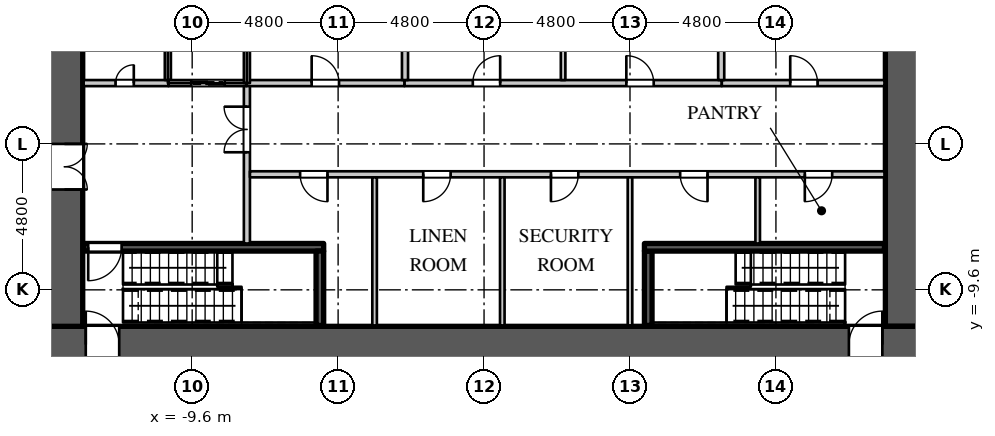
"""IFC4 building model, lengths in metres.
Left out: names, types, materials, properties, quantities, classifications, styles, units other than length and angle.
Written with IfcOpenShell. Run it as: python <this file> out.ifc"""

import sys

from ifc_helpers import new_model, si_unit, direction, frame, frame_2d, origin, place, context, subcontext, project, spatial, rectangle, extrude, element, fill, save


model = new_model("IFC4")
c1 = context("Model", 3, precision=1e-05, world=origin(), true_north=direction((0.0, 1.0)))
c2 = subcontext(c1, "Body", "Model", "MODEL_VIEW")
j1 = project(units=[si_unit("LENGTHUNIT", "METRE"), si_unit("PLANEANGLEUNIT", "RADIAN")], contexts=[c1])
p1 = place(None, origin())
s1 = spatial("IfcSite", under=j1, at=p1, CompositionType="ELEMENT")
p2 = place(p1, origin())
s2 = spatial("IfcBuilding", under=s1, at=p2, CompositionType="ELEMENT")
p3 = place(p2, frame((0.0, 0.0, -4.5)))
s3 = spatial("IfcBuildingStorey", under=s2, at=p3, CompositionType="ELEMENT", Elevation=-4.5)
p4 = place(p3, frame((-14.4, -11.4, 0.0), z_axis=(0.0, 0.0, 1.0), x_axis=(1.0, 0.0, 0.0)))
e1 = element("IfcWall", 1, at=p4, inside=s3, PredefinedType="SHEAR", context=c2, shape_type="SweptSolid", body=[
    extrude(rectangle(XDim=28.8, YDim=1.2, at=frame_2d((14.4, 0.0))), origin(), (0.0, 0.0, 1.0), 4.5),
])
p5 = place(p4, frame((1.3, 0.0, 0.0)))
e2 = element("IfcOpeningElement", 2, at=p5, cuts=e1, PredefinedType="OPENING", context=c2, shape_type="SweptSolid", body=[
    extrude(rectangle(XDim=1.1, YDim=2.2, at=frame_2d((0.55, 1.1))), frame((0.0, 0.61, 0.0), z_axis=(0.0, -1.0, 0.0), x_axis=(1.0, 0.0, 0.0)), (0.0, 0.0, 1.0), 1.22),
])
p6 = place(p4, frame((26.4, 0.0, 0.0)))
e3 = element("IfcOpeningElement", 3, at=p6, cuts=e1, PredefinedType="OPENING", context=c2, shape_type="SweptSolid", body=[
    extrude(rectangle(XDim=1.1, YDim=2.2, at=frame_2d((0.55, 1.1))), frame((0.0, 0.61, 0.0), z_axis=(0.0, -1.0, 0.0), x_axis=(1.0, 0.0, 0.0)), (0.0, 0.0, 1.0), 1.22),
])
p7 = place(p3, frame((13.8, -10.8, 0.0), z_axis=(0.0, 0.0, 1.0), x_axis=(0.0, 1.0, 0.0)))
e4 = element("IfcWall", 4, at=p7, inside=s3, PredefinedType="SHEAR", context=c2, shape_type="SweptSolid", body=[
    extrude(rectangle(XDim=21.6, YDim=1.2, at=frame_2d((10.8, 0.0))), origin(), (0.0, 0.0, 1.0), 4.5),
])
p8 = place(p7, frame((14.35, 0.0, 0.0)))
e5 = element("IfcOpeningElement", 5, at=p8, cuts=e4, PredefinedType="OPENING", context=c2, shape_type="SweptSolid", body=[
    extrude(rectangle(XDim=1.5, YDim=2.4, at=frame_2d((0.75, 1.2))), frame((0.0, 0.61, 0.0), z_axis=(0.0, -1.0, 0.0), x_axis=(1.0, 0.0, 0.0)), (0.0, 0.0, 1.0), 1.22),
])
p9 = place(p3, frame((-13.8, -10.8, 0.0), z_axis=(0.0, 0.0, 1.0), x_axis=(0.0, 1.0, 0.0)))
e6 = element("IfcWall", 6, at=p9, inside=s3, PredefinedType="SHEAR", context=c2, shape_type="SweptSolid", body=[
    extrude(rectangle(XDim=21.6, YDim=1.2, at=frame_2d((10.8, 0.0))), origin(), (0.0, 0.0, 1.0), 4.5),
])
p10 = place(p9, frame((15.5, 0.0, 0.0)))
e7 = element("IfcOpeningElement", 7, at=p10, cuts=e6, PredefinedType="OPENING", context=c2, shape_type="SweptSolid", body=[
    extrude(rectangle(XDim=1.5, YDim=2.4, at=frame_2d((0.75, 1.2))), frame((0.0, 0.61, 0.0), z_axis=(0.0, -1.0, 0.0), x_axis=(1.0, 0.0, 0.0)), (0.0, 0.0, 1.0), 1.22),
])
p11 = place(p9, frame((4.5, 0.0, 0.0)))
e8 = element("IfcOpeningElement", 8, at=p11, cuts=e6, PredefinedType="OPENING", context=c2, shape_type="SweptSolid", body=[
    extrude(rectangle(XDim=1.5, YDim=2.4, at=frame_2d((0.75, 1.2))), frame((0.0, 0.61, 0.0), z_axis=(0.0, -1.0, 0.0), x_axis=(1.0, 0.0, 0.0)), (0.0, 0.0, 1.0), 1.22),
])
p12 = place(p3, frame((-7.8, -8.075, 0.0), z_axis=(0.0, 0.0, 1.0), x_axis=(0.0, 1.0, 0.0)))
e9 = element("IfcWall", 9, at=p12, inside=s3, PredefinedType="PARTITIONING", context=c2, shape_type="SweptSolid", body=[
    extrude(rectangle(XDim=5.275, YDim=0.2, at=frame_2d((2.637, 0.0))), origin(), (0.0, 0.0, 1.0), 4.048),
])
p13 = place(p12, frame((3.0, 0.0, 0.0)))
e10 = element("IfcOpeningElement", 10, at=p13, cuts=e9, PredefinedType="OPENING", context=c2, shape_type="SweptSolid", body=[
    extrude(rectangle(XDim=1.5, YDim=2.4, at=frame_2d((0.75, 1.2))), frame((0.0, 0.11, 0.0), z_axis=(0.0, -1.0, 0.0), x_axis=(1.0, 0.0, 0.0)), (0.0, 0.0, 1.0), 0.22),
])
p14 = place(p3, frame((-7.7, -5.8, 0.0), z_axis=(0.0, 0.0, 1.0), x_axis=(1.0, 0.0, 0.0)))
e11 = element("IfcWall", 11, at=p14, inside=s3, PredefinedType="PARTITIONING", context=c2, shape_type="SweptSolid", body=[
    extrude(rectangle(XDim=20.87, YDim=0.2, at=frame_2d((10.435, 0.0))), origin(), (0.0, 0.0, 1.0), 4.048),
])
p15 = place(p14, frame((1.65, 0.0, 0.0)))
e12 = element("IfcOpeningElement", 12, at=p15, cuts=e11, PredefinedType="OPENING", context=c2, shape_type="SweptSolid", body=[
    extrude(rectangle(XDim=0.9, YDim=2.2, at=frame_2d((0.45, 1.1))), frame((0.0, 0.11, 0.0), z_axis=(0.0, -1.0, 0.0), x_axis=(1.0, 0.0, 0.0)), (0.0, 0.0, 1.0), 0.22),
])
p16 = place(p14, frame((5.7, 0.0, 0.0)))
e13 = element("IfcOpeningElement", 13, at=p16, cuts=e11, PredefinedType="OPENING", context=c2, shape_type="SweptSolid", body=[
    extrude(rectangle(XDim=0.9, YDim=2.2, at=frame_2d((0.45, 1.1))), frame((0.0, 0.11, 0.0), z_axis=(0.0, -1.0, 0.0), x_axis=(1.0, 0.0, 0.0)), (0.0, 0.0, 1.0), 0.22),
])
p17 = place(p14, frame((9.9, 0.0, 0.0)))
e14 = element("IfcOpeningElement", 14, at=p17, cuts=e11, PredefinedType="OPENING", context=c2, shape_type="SweptSolid", body=[
    extrude(rectangle(XDim=0.9, YDim=2.2, at=frame_2d((0.45, 1.1))), frame((0.0, 0.11, 0.0), z_axis=(0.0, -1.0, 0.0), x_axis=(1.0, 0.0, 0.0)), (0.0, 0.0, 1.0), 0.22),
])
p18 = place(p14, frame((14.15, 0.0, 0.0)))
e15 = element("IfcOpeningElement", 15, at=p18, cuts=e11, PredefinedType="OPENING", context=c2, shape_type="SweptSolid", body=[
    extrude(rectangle(XDim=0.9, YDim=2.2, at=frame_2d((0.45, 1.1))), frame((0.0, 0.11, 0.0), z_axis=(0.0, -1.0, 0.0), x_axis=(1.0, 0.0, 0.0)), (0.0, 0.0, 1.0), 0.22),
])
p19 = place(p14, frame((18.25, 0.0, 0.0)))
e16 = element("IfcOpeningElement", 16, at=p19, cuts=e11, PredefinedType="OPENING", context=c2, shape_type="SweptSolid", body=[
    extrude(rectangle(XDim=0.9, YDim=2.2, at=frame_2d((0.45, 1.1))), frame((0.0, 0.11, 0.0), z_axis=(0.0, -1.0, 0.0), x_axis=(1.0, 0.0, 0.0)), (0.0, 0.0, 1.0), 0.22),
])
p20 = place(p3, frame((-2.62, -2.8, 0.0), z_axis=(0.0, 0.0, 1.0), x_axis=(1.0, 0.0, 0.0)))
e17 = element("IfcWall", 17, at=p20, inside=s3, PredefinedType="PARTITIONING", context=c2, shape_type="SweptSolid", body=[
    extrude(rectangle(XDim=10.44, YDim=0.2, at=frame_2d((5.22, 0.0))), origin(), (0.0, 0.0, 1.0), 4.048),
])
p21 = place(p20, frame((2.25, 0.0, 0.0)))
e18 = element("IfcOpeningElement", 18, at=p21, cuts=e17, PredefinedType="OPENING", context=c2, shape_type="SweptSolid", body=[
    extrude(rectangle(XDim=0.9, YDim=2.2, at=frame_2d((0.45, 1.1))), frame((0.0, 0.11, 0.0), z_axis=(0.0, -1.0, 0.0), x_axis=(1.0, 0.0, 0.0)), (0.0, 0.0, 1.0), 0.22),
])
p22 = place(p20, frame((7.3, 0.0, 0.0)))
e19 = element("IfcOpeningElement", 19, at=p22, cuts=e17, PredefinedType="OPENING", context=c2, shape_type="SweptSolid", body=[
    extrude(rectangle(XDim=0.9, YDim=2.2, at=frame_2d((0.45, 1.1))), frame((0.0, 0.11, 0.0), z_axis=(0.0, -1.0, 0.0), x_axis=(1.0, 0.0, 0.0)), (0.0, 0.0, 1.0), 0.22),
])
for number, where, z_axis, x_axis in (
    (20, (-3.6, -10.77, 0.0), (0.0, 0.0, 1.0), (0.0, 1.0, 0.0)),
    (21, (0.6, -10.77, 0.0), (0.0, 0.0, 1.0), (0.0, 1.0, 0.0)),
):
    element("IfcWall", number, at=place(p3, frame(where, z_axis=z_axis, x_axis=x_axis)), inside=s3, PredefinedType="PARTITIONING", context=c2, shape_type="SweptSolid", body=[
        extrude(rectangle(XDim=4.87, YDim=0.15, at=frame_2d((2.435, 0.0))), origin(), (0.0, 0.0, 1.0), 4.048),
    ])
p23 = place(p3, frame((2.6, -2.7, 0.0), z_axis=(0.0, 0.0, 1.0), x_axis=(0.0, 1.0, 0.0)))
e22 = element("IfcWall", 22, at=p23, inside=s3, PredefinedType="PARTITIONING", context=c2, shape_type="SweptSolid", body=[
    extrude(rectangle(XDim=2.7, YDim=0.15, at=frame_2d((1.35, 0.0))), origin(), (0.0, 0.0, 1.0), 4.048),
])
p24 = place(p3, frame((4.8, -10.77, 0.0), z_axis=(0.0, 0.0, 1.0), x_axis=(0.0, 1.0, 0.0)))
e23 = element("IfcWall", 23, at=p24, inside=s3, PredefinedType="PARTITIONING", context=c2, shape_type="SweptSolid", body=[
    extrude(rectangle(XDim=4.87, YDim=0.15, at=frame_2d((2.435, 0.0))), origin(), (0.0, 0.0, 1.0), 4.048),
])
p25 = place(p3, frame((9.0, -8.075, 0.0), z_axis=(0.0, 0.0, 1.0), x_axis=(0.0, 1.0, 0.0)))
e24 = element("IfcWall", 24, at=p25, inside=s3, PredefinedType="PARTITIONING", context=c2, shape_type="SweptSolid", body=[
    extrude(rectangle(XDim=2.175, YDim=0.15, at=frame_2d((1.087, 0.0))), origin(), (0.0, 0.0, 1.0), 4.048),
])
p26 = place(p3, frame((-13.17, -2.8, 0.0), z_axis=(0.0, 0.0, 1.0), x_axis=(1.0, 0.0, 0.0)))
e25 = element("IfcWall", 25, at=p26, inside=s3, PredefinedType="PARTITIONING", context=c2, shape_type="SweptSolid", body=[
    extrude(rectangle(XDim=2.79, YDim=0.2, at=frame_2d((1.395, 0.0))), origin(), (0.0, 0.0, 1.0), 4.048),
])
p27 = place(p26, frame((1.05, 0.0, 0.0)))
e26 = element("IfcOpeningElement", 26, at=p27, cuts=e25, PredefinedType="OPENING", context=c2, shape_type="SweptSolid", body=[
    extrude(rectangle(XDim=0.6, YDim=2.0, at=frame_2d((0.3, 1.0))), frame((0.0, 0.11, 0.0), z_axis=(0.0, -1.0, 0.0), x_axis=(1.0, 0.0, 0.0)), (0.0, 0.0, 1.0), 0.22),
])
p28 = place(p3, frame((-7.82, -2.8, 0.0), z_axis=(0.0, 0.0, 1.0), x_axis=(1.0, 0.0, 0.0)))
e27 = element("IfcWall", 27, at=p28, inside=s3, PredefinedType="PARTITIONING", context=c2, shape_type="SweptSolid", body=[
    extrude(rectangle(XDim=5.2, YDim=0.2, at=frame_2d((2.6, 0.0))), origin(), (0.0, 0.0, 1.0), 4.048),
])
p29 = place(p28, frame((2.15, 0.0, 0.0)))
e28 = element("IfcOpeningElement", 28, at=p29, cuts=e27, PredefinedType="OPENING", context=c2, shape_type="SweptSolid", body=[
    extrude(rectangle(XDim=0.9, YDim=2.2, at=frame_2d((0.45, 1.1))), frame((0.0, 0.11, 0.0), z_axis=(0.0, -1.0, 0.0), x_axis=(1.0, 0.0, 0.0)), (0.0, 0.0, 1.0), 0.22),
])
p30 = place(p3, frame((-2.6, -2.7, 0.0), z_axis=(0.0, 0.0, 1.0), x_axis=(0.0, 1.0, 0.0)))
e29 = element("IfcWall", 29, at=p30, inside=s3, PredefinedType="PARTITIONING", context=c2, shape_type="SweptSolid", body=[
    extrude(rectangle(XDim=2.7, YDim=0.2, at=frame_2d((1.35, 0.0))), origin(), (0.0, 0.0, 1.0), 4.048),
])
p31 = place(p3, frame((7.82, -2.8, 0.0), z_axis=(0.0, 0.0, 1.0), x_axis=(1.0, 0.0, 0.0)))
e30 = element("IfcWall", 30, at=p31, inside=s3, PredefinedType="PARTITIONING", context=c2, shape_type="SweptSolid", body=[
    extrude(rectangle(XDim=5.35, YDim=0.2, at=frame_2d((2.675, 0.0))), origin(), (0.0, 0.0, 1.0), 4.048),
])
p32 = place(p31, frame((2.25, 0.0, 0.0)))
e31 = element("IfcOpeningElement", 31, at=p32, cuts=e30, PredefinedType="OPENING", context=c2, shape_type="SweptSolid", body=[
    extrude(rectangle(XDim=0.9, YDim=2.2, at=frame_2d((0.45, 1.1))), frame((0.0, 0.11, 0.0), z_axis=(0.0, -1.0, 0.0), x_axis=(1.0, 0.0, 0.0)), (0.0, 0.0, 1.0), 0.22),
])
for number, where, z_axis, x_axis in (
    (32, (7.8, -2.7, 0.0), (0.0, 0.0, 1.0), (0.0, 1.0, 0.0)),
    (33, (-10.4, -2.7, 0.0), (0.0, 0.0, 1.0), (0.0, 1.0, 0.0)),
):
    element("IfcWall", number, at=place(p3, frame(where, z_axis=z_axis, x_axis=x_axis)), inside=s3, PredefinedType="PARTITIONING", context=c2, shape_type="SweptSolid", body=[
        extrude(rectangle(XDim=2.7, YDim=0.2, at=frame_2d((1.35, 0.0))), origin(), (0.0, 0.0, 1.0), 4.048),
    ])
p33 = place(p3, frame((-10.38, -2.8, 0.0), z_axis=(0.0, 0.0, 1.0), x_axis=(1.0, 0.0, 0.0)))
e34 = element("IfcWall", 34, at=p33, inside=s3, PredefinedType="PARTITIONING", context=c2, shape_type="SweptSolid", body=[
    extrude(rectangle(XDim=2.56, YDim=0.2, at=frame_2d((1.28, 0.0))), origin(), (0.0, 0.0, 1.0), 4.048),
])
p34 = place(p33, frame((0.75, 0.0, 0.0)))
e35 = element("IfcOpeningElement", 35, at=p34, cuts=e34, PredefinedType="OPENING", context=c2, shape_type="SweptSolid", body=[
    extrude(rectangle(XDim=1.1, YDim=2.2, at=frame_2d((0.55, 1.1))), frame((0.0, 0.11, 0.0), z_axis=(0.0, -1.0, 0.0), x_axis=(1.0, 0.0, 0.0)), (0.0, 0.0, 1.0), 0.22),
])
p35 = place(p3, frame((-7.8, -2.8, 0.0), z_axis=(0.0, 0.0, 1.0), x_axis=(0.0, 1.0, 0.0)))
e36 = element("IfcWall", 36, at=p35, inside=s3, PredefinedType="PARTITIONING", context=c2, shape_type="SweptSolid", body=[
    extrude(rectangle(XDim=2.8, YDim=0.2, at=frame_2d((1.4, 0.0))), origin(), (0.0, 0.0, 1.0), 4.048),
])
p36 = place(p3, frame((-13.17, -8.2, 0.0), z_axis=(0.0, 0.0, 1.0), x_axis=(1.0, 0.0, 0.0)))
e37 = element("IfcWall", 37, at=p36, inside=s3, PredefinedType="SHEAR", context=c2, shape_type="SweptSolid", body=[
    extrude(rectangle(XDim=7.895, YDim=0.25, at=frame_2d((3.948, 0.0))), origin(), (0.0, 0.0, 1.0), 4.048),
])
p37 = place(p36, frame((0.15, 0.0, 0.0)))
e38 = element("IfcOpeningElement", 38, at=p37, cuts=e37, PredefinedType="OPENING", context=c2, shape_type="SweptSolid", body=[
    extrude(rectangle(XDim=1.1, YDim=2.2, at=frame_2d((0.55, 1.1))), frame((0.0, 0.135, 0.0), z_axis=(0.0, -1.0, 0.0), x_axis=(1.0, 0.0, 0.0)), (0.0, 0.0, 1.0), 0.27),
])
for number, where, z_axis, x_axis in (
    (39, (-5.4, -10.77, 0.0), (0.0, 0.0, 1.0), (0.0, 1.0, 0.0)),
    (40, (5.4, -10.77, 0.0), (0.0, 0.0, 1.0), (0.0, 1.0, 0.0)),
):
    element("IfcWall", number, at=place(p3, frame(where, z_axis=z_axis, x_axis=x_axis)), inside=s3, PredefinedType="SHEAR", context=c2, shape_type="SweptSolid", body=[
        extrude(rectangle(XDim=2.445, YDim=0.25, at=frame_2d((1.223, 0.0))), origin(), (0.0, 0.0, 1.0), 4.048),
    ])
p38 = place(p3, frame((5.275, -8.2, 0.0), z_axis=(0.0, 0.0, 1.0), x_axis=(1.0, 0.0, 0.0)))
e41 = element("IfcWall", 41, at=p38, inside=s3, PredefinedType="SHEAR", context=c2, shape_type="SweptSolid", body=[
    extrude(rectangle(XDim=7.895, YDim=0.25, at=frame_2d((3.948, 0.0))), origin(), (0.0, 0.0, 1.0), 4.048),
])
p39 = place(p27, origin())
e42 = element("IfcDoor", 42, at=p39, inside=s3, OperationType="SINGLE_SWING_RIGHT", PredefinedType="DOOR", context=c2, shape_type="SweptSolid", body=[
    extrude(rectangle(XDim=0.6, YDim=2.0, at=frame_2d((0.3, 1.0))), frame((0.0, 0.025, 0.0), z_axis=(0.0, -1.0, 0.0), x_axis=(1.0, 0.0, 0.0)), (0.0, 0.0, 1.0), 0.05),
])
fill(e26, e42)
p40 = place(p32, origin())
e43 = element("IfcDoor", 43, at=p40, inside=s3, OperationType="SINGLE_SWING_LEFT", PredefinedType="DOOR", context=c2, shape_type="SweptSolid", body=[
    extrude(rectangle(XDim=0.9, YDim=2.2, at=frame_2d((0.45, 1.1))), frame((0.0, 0.025, 0.0), z_axis=(0.0, -1.0, 0.0), x_axis=(1.0, 0.0, 0.0)), (0.0, 0.0, 1.0), 0.05),
])
fill(e31, e43)
p41 = place(p15, origin())
e44 = element("IfcDoor", 44, at=p41, inside=s3, OperationType="SINGLE_SWING_LEFT", PredefinedType="DOOR", context=c2, shape_type="SweptSolid", body=[
    extrude(rectangle(XDim=0.9, YDim=2.2, at=frame_2d((0.45, 1.1))), frame((0.0, 0.025, 0.0), z_axis=(0.0, -1.0, 0.0), x_axis=(1.0, 0.0, 0.0)), (0.0, 0.0, 1.0), 0.05),
])
fill(e12, e44)
p42 = place(p16, origin())
e45 = element("IfcDoor", 45, at=p42, inside=s3, OperationType="SINGLE_SWING_RIGHT", PredefinedType="DOOR", context=c2, shape_type="SweptSolid", body=[
    extrude(rectangle(XDim=0.9, YDim=2.2, at=frame_2d((0.45, 1.1))), frame((0.0, 0.025, 0.0), z_axis=(0.0, -1.0, 0.0), x_axis=(1.0, 0.0, 0.0)), (0.0, 0.0, 1.0), 0.05),
])
fill(e13, e45)
p43 = place(p17, origin())
e46 = element("IfcDoor", 46, at=p43, inside=s3, OperationType="SINGLE_SWING_RIGHT", PredefinedType="DOOR", context=c2, shape_type="SweptSolid", body=[
    extrude(rectangle(XDim=0.9, YDim=2.2, at=frame_2d((0.45, 1.1))), frame((0.0, 0.025, 0.0), z_axis=(0.0, -1.0, 0.0), x_axis=(1.0, 0.0, 0.0)), (0.0, 0.0, 1.0), 0.05),
])
fill(e14, e46)
p44 = place(p18, origin())
e47 = element("IfcDoor", 47, at=p44, inside=s3, OperationType="SINGLE_SWING_LEFT", PredefinedType="DOOR", context=c2, shape_type="SweptSolid", body=[
    extrude(rectangle(XDim=0.9, YDim=2.2, at=frame_2d((0.45, 1.1))), frame((0.0, 0.025, 0.0), z_axis=(0.0, -1.0, 0.0), x_axis=(1.0, 0.0, 0.0)), (0.0, 0.0, 1.0), 0.05),
])
fill(e15, e47)
p45 = place(p19, origin())
e48 = element("IfcDoor", 48, at=p45, inside=s3, OperationType="SINGLE_SWING_RIGHT", PredefinedType="DOOR", context=c2, shape_type="SweptSolid", body=[
    extrude(rectangle(XDim=0.9, YDim=2.2, at=frame_2d((0.45, 1.1))), frame((0.0, 0.025, 0.0), z_axis=(0.0, -1.0, 0.0), x_axis=(1.0, 0.0, 0.0)), (0.0, 0.0, 1.0), 0.05),
])
fill(e16, e48)
p46 = place(p29, origin())
e49 = element("IfcDoor", 49, at=p46, inside=s3, OperationType="SINGLE_SWING_LEFT", PredefinedType="DOOR", context=c2, shape_type="SweptSolid", body=[
    extrude(rectangle(XDim=0.9, YDim=2.2, at=frame_2d((0.45, 1.1))), frame((0.0, 0.025, 0.0), z_axis=(0.0, -1.0, 0.0), x_axis=(1.0, 0.0, 0.0)), (0.0, 0.0, 1.0), 0.05),
])
fill(e28, e49)
p47 = place(p21, origin())
e50 = element("IfcDoor", 50, at=p47, inside=s3, OperationType="SINGLE_SWING_RIGHT", PredefinedType="DOOR", context=c2, shape_type="SweptSolid", body=[
    extrude(rectangle(XDim=0.9, YDim=2.2, at=frame_2d((0.45, 1.1))), frame((0.0, 0.025, 0.0), z_axis=(0.0, -1.0, 0.0), x_axis=(1.0, 0.0, 0.0)), (0.0, 0.0, 1.0), 0.05),
])
fill(e18, e50)
p48 = place(p22, origin())
e51 = element("IfcDoor", 51, at=p48, inside=s3, OperationType="SINGLE_SWING_LEFT", PredefinedType="DOOR", context=c2, shape_type="SweptSolid", body=[
    extrude(rectangle(XDim=0.9, YDim=2.2, at=frame_2d((0.45, 1.1))), frame((0.0, 0.025, 0.0), z_axis=(0.0, -1.0, 0.0), x_axis=(1.0, 0.0, 0.0)), (0.0, 0.0, 1.0), 0.05),
])
fill(e19, e51)
p49 = place(p34, origin())
e52 = element("IfcDoor", 52, at=p49, inside=s3, OperationType="DOUBLE_DOOR_SLIDING", PredefinedType="DOOR", context=c2, shape_type="SweptSolid", body=[
    extrude(rectangle(XDim=1.1, YDim=2.2, at=frame_2d((0.55, 1.1))), frame((0.0, 0.025, 0.0), z_axis=(0.0, -1.0, 0.0), x_axis=(1.0, 0.0, 0.0)), (0.0, 0.0, 1.0), 0.05),
])
fill(e35, e52)
p50 = place(p37, origin())
e53 = element("IfcDoor", 53, at=p50, inside=s3, OperationType="SINGLE_SWING_RIGHT", PredefinedType="DOOR", context=c2, shape_type="SweptSolid", body=[
    extrude(rectangle(XDim=1.1, YDim=2.2, at=frame_2d((0.55, 1.1))), frame((0.0, 0.025, 0.0), z_axis=(0.0, -1.0, 0.0), x_axis=(1.0, 0.0, 0.0)), (0.0, 0.0, 1.0), 0.05),
])
fill(e38, e53)
p51 = place(p13, origin())
e54 = element("IfcDoor", 54, at=p51, inside=s3, OperationType="DOUBLE_DOOR_SINGLE_SWING", PredefinedType="DOOR", context=c2, shape_type="SweptSolid", body=[
    extrude(rectangle(XDim=1.5, YDim=2.4, at=frame_2d((0.75, 1.2))), frame((0.0, 0.025, 0.0), z_axis=(0.0, -1.0, 0.0), x_axis=(1.0, 0.0, 0.0)), (0.0, 0.0, 1.0), 0.05),
])
fill(e10, e54)
p52 = place(p11, origin())
e55 = element("IfcDoor", 55, at=p52, inside=s3, OperationType="DOUBLE_DOOR_SINGLE_SWING", PredefinedType="DOOR", context=c2, shape_type="SweptSolid", body=[
    extrude(rectangle(XDim=1.5, YDim=2.4, at=frame_2d((0.75, 1.2))), frame((0.0, 0.025, 0.0), z_axis=(0.0, -1.0, 0.0), x_axis=(1.0, 0.0, 0.0)), (0.0, 0.0, 1.0), 0.05),
])
fill(e8, e55)
p53 = place(p5, origin())
e56 = element("IfcDoor", 56, at=p53, inside=s3, OperationType="SINGLE_SWING_LEFT", PredefinedType="DOOR", context=c2, shape_type="SweptSolid", body=[
    extrude(rectangle(XDim=1.1, YDim=2.2, at=frame_2d((0.55, 1.1))), frame((0.0, 0.025, 0.0), z_axis=(0.0, -1.0, 0.0), x_axis=(1.0, 0.0, 0.0)), (0.0, 0.0, 1.0), 0.05),
])
fill(e2, e56)
p54 = place(p6, origin())
e57 = element("IfcDoor", 57, at=p54, inside=s3, OperationType="SINGLE_SWING_RIGHT", PredefinedType="DOOR", context=c2, shape_type="SweptSolid", body=[
    extrude(rectangle(XDim=1.1, YDim=2.2, at=frame_2d((0.55, 1.1))), frame((0.0, 0.025, 0.0), z_axis=(0.0, -1.0, 0.0), x_axis=(1.0, 0.0, 0.0)), (0.0, 0.0, 1.0), 0.05),
])
fill(e3, e57)
save(model, sys.argv[1])
